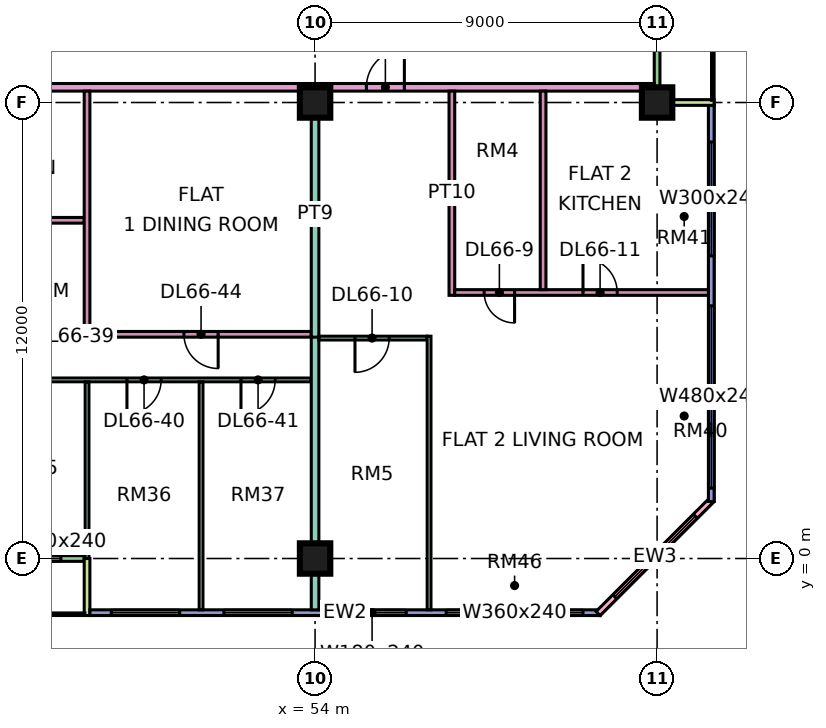
"""IFC4 building model, lengths in metres.
Left out: names, types, materials, properties, quantities, classifications, styles, units other than length and angle.
Written with IfcOpenShell. Run it as: python <this file> out.ifc"""

import sys

from ifc_helpers import new_model, si_unit, direction, frame, frame_2d, origin, origin_2d, place, context, subcontext, project, spatial, rectangle, extrude, element, fill, save


model = new_model("IFC4")
c1 = context("Model", 3, precision=1e-05, world=origin(), true_north=direction((0.0, 1.0)))
c2 = subcontext(c1, "Body", "Model", "MODEL_VIEW")
j1 = project(units=[si_unit("LENGTHUNIT", "METRE"), si_unit("PLANEANGLEUNIT", "RADIAN")], contexts=[c1])
p1 = place(None, origin())
s1 = spatial("IfcSite", under=j1, at=p1, CompositionType="ELEMENT")
p2 = place(p1, origin())
s2 = spatial("IfcBuilding", under=s1, at=p2, CompositionType="ELEMENT")
p3 = place(p2, frame((0.0, 0.0, 284.65)))
s3 = spatial("IfcBuildingStorey", under=s2, at=p3, CompositionType="ELEMENT", Elevation=284.65)
for number, where, z_axis, x_axis in (
    (1, (54.0, 0.0, 0.0), (0.0, 0.0, 1.0), (1.0, 0.0, 0.0)),
    (2, (54.0, 12.0, 0.0), (0.0, 0.0, 1.0), (1.0, 0.0, 0.0)),
    (3, (63.0, 12.0, 0.0), (0.0, 0.0, 1.0), (1.0, 0.0, 0.0)),
):
    element("IfcColumn", number, at=place(p3, frame(where, z_axis=z_axis, x_axis=x_axis)), inside=s3, PredefinedType="COLUMN", context=c2, shape_type="SweptSolid", body=[
        extrude(rectangle(XDim=0.8, YDim=0.8, at=origin_2d()), origin(), (0.0, 0.0, 1.0), 3.75),
    ])
p4 = place(p3, frame((36.075, 0.0, 0.0), z_axis=(0.0, 0.0, 1.0), x_axis=(1.0, 0.0, 0.0)))
e4 = element("IfcWall", 4, at=p4, inside=s3, PredefinedType="SOLIDWALL", context=c2, shape_type="SweptSolid", body=[
    extrude(rectangle(XDim=11.85, YDim=0.15, at=frame_2d((5.925, 0.0))), origin(), (0.0, 0.0, 1.0), 3.35),
])
p5 = place(p4, frame((2.275, 0.0, 0.0)))
e5 = element("IfcOpeningElement", 5, at=p5, cuts=e4, PredefinedType="OPENING", context=c2, shape_type="SweptSolid", body=[
    extrude(rectangle(XDim=1.8, YDim=2.4, at=frame_2d((0.9, 1.2))), frame((0.0, 0.085, 0.0), z_axis=(0.0, -1.0, 0.0), x_axis=(1.0, 0.0, 0.0)), (0.0, 0.0, 1.0), 0.17),
])
p6 = place(p4, frame((6.275, 0.0, 0.45)))
e6 = element("IfcOpeningElement", 6, at=p6, cuts=e4, PredefinedType="OPENING", context=c2, shape_type="SweptSolid", body=[
    extrude(rectangle(XDim=1.8, YDim=2.4, at=frame_2d((0.9, 1.2))), frame((0.0, 0.085, 0.0), z_axis=(0.0, -1.0, 0.0), x_axis=(1.0, 0.0, 0.0)), (0.0, 0.0, 1.0), 0.17),
])
p7 = place(p4, frame((10.038, 0.0, 0.45)))
e7 = element("IfcOpeningElement", 7, at=p7, cuts=e4, PredefinedType="OPENING", context=c2, shape_type="SweptSolid", body=[
    extrude(rectangle(XDim=1.2, YDim=2.4, at=frame_2d((0.6, 1.2))), frame((0.0, 0.085, 0.0), z_axis=(0.0, -1.0, 0.0), x_axis=(1.0, 0.0, 0.0)), (0.0, 0.0, 1.0), 0.17),
])
p8 = place(p3, frame((48.0, -1.5, 0.0), z_axis=(0.0, 0.0, 1.0), x_axis=(0.0, 1.0, 0.0)))
e8 = element("IfcWall", 8, at=p8, inside=s3, PredefinedType="SOLIDWALL", context=c2, shape_type="SweptSolid", body=[
    extrude(rectangle(XDim=1.5, YDim=0.15, at=frame_2d((0.75, 0.0))), origin(), (0.0, 0.0, 1.0), 3.35),
])
p9 = place(p3, frame((48.075, -1.425, 0.0), z_axis=(0.0, 0.0, 1.0), x_axis=(1.0, 0.0, 0.0)))
e9 = element("IfcWall", 9, at=p9, inside=s3, PredefinedType="SOLIDWALL", context=c2, shape_type="SweptSolid", body=[
    extrude(rectangle(XDim=13.425, YDim=0.15, at=frame_2d((6.712, 0.0))), origin(), (0.0, 0.0, 1.0), 3.35),
])
p10 = place(p9, frame((0.562, 0.0, 0.45)))
e10 = element("IfcOpeningElement", 10, at=p10, cuts=e9, PredefinedType="OPENING", context=c2, shape_type="SweptSolid", body=[
    extrude(rectangle(XDim=1.8, YDim=2.4, at=frame_2d((0.9, 1.2))), frame((0.0, 0.085, 0.0), z_axis=(0.0, -1.0, 0.0), x_axis=(1.0, 0.0, 0.0)), (0.0, 0.0, 1.0), 0.17),
])
p11 = place(p9, frame((3.525, 0.0, 0.45)))
e11 = element("IfcOpeningElement", 11, at=p11, cuts=e9, PredefinedType="OPENING", context=c2, shape_type="SweptSolid", body=[
    extrude(rectangle(XDim=1.8, YDim=2.4, at=frame_2d((0.9, 1.2))), frame((0.0, 0.085, 0.0), z_axis=(0.0, -1.0, 0.0), x_axis=(1.0, 0.0, 0.0)), (0.0, 0.0, 1.0), 0.17),
])
p12 = place(p9, frame((6.525, 0.0, 0.45)))
e12 = element("IfcOpeningElement", 12, at=p12, cuts=e9, PredefinedType="OPENING", context=c2, shape_type="SweptSolid", body=[
    extrude(rectangle(XDim=1.8, YDim=2.4, at=frame_2d((0.9, 1.2))), frame((0.0, 0.085, 0.0), z_axis=(0.0, -1.0, 0.0), x_axis=(1.0, 0.0, 0.0)), (0.0, 0.0, 1.0), 0.17),
])
p13 = place(p9, frame((9.375, 0.0, 0.45)))
e13 = element("IfcOpeningElement", 13, at=p13, cuts=e9, PredefinedType="OPENING", context=c2, shape_type="SweptSolid", body=[
    extrude(rectangle(XDim=3.6, YDim=2.4, at=frame_2d((1.8, 1.2))), frame((0.0, 0.085, 0.0), z_axis=(0.0, -1.0, 0.0), x_axis=(1.0, 0.0, 0.0)), (0.0, 0.0, 1.0), 0.17),
])
p14 = place(p3, frame((61.447, -1.447, 0.0), z_axis=(0.0, 0.0, 1.0), x_axis=(0.707106781187, 0.707106781187, 0.0)))
e14 = element("IfcWall", 14, at=p14, inside=s3, PredefinedType="SOLIDWALL", context=c2, shape_type="SweptSolid", body=[
    extrude(rectangle(XDim=4.243, YDim=0.15, at=frame_2d((2.121, 0.0))), origin(), (0.0, 0.0, 1.0), 3.35),
])
p15 = place(p14, frame((0.621, 0.0, 0.45)))
e15 = element("IfcOpeningElement", 15, at=p15, cuts=e14, PredefinedType="OPENING", context=c2, shape_type="SweptSolid", body=[
    extrude(rectangle(XDim=3.0, YDim=2.4, at=frame_2d((1.5, 1.2))), frame((0.0, 0.085, 0.0), z_axis=(0.0, -1.0, 0.0), x_axis=(1.0, 0.0, 0.0)), (0.0, 0.0, 1.0), 0.17),
])
p16 = place(p3, frame((64.425, 1.5, 0.0), z_axis=(0.0, 0.0, 1.0), x_axis=(0.0, 1.0, 0.0)))
e16 = element("IfcWall", 16, at=p16, inside=s3, PredefinedType="SOLIDWALL", context=c2, shape_type="SweptSolid", body=[
    extrude(rectangle(XDim=10.425, YDim=0.15, at=frame_2d((5.212, 0.0))), origin(), (0.0, 0.0, 1.0), 3.35),
])
p17 = place(p16, frame((0.35, 0.0, 0.45)))
e17 = element("IfcOpeningElement", 17, at=p17, cuts=e16, PredefinedType="OPENING", context=c2, shape_type="SweptSolid", body=[
    extrude(rectangle(XDim=4.8, YDim=2.4, at=frame_2d((2.4, 1.2))), frame((0.0, 0.085, 0.0), z_axis=(0.0, -1.0, 0.0), x_axis=(1.0, 0.0, 0.0)), (0.0, 0.0, 1.0), 0.17),
])
p18 = place(p16, frame((6.462, 0.0, 0.45)))
e18 = element("IfcOpeningElement", 18, at=p18, cuts=e16, PredefinedType="OPENING", context=c2, shape_type="SweptSolid", body=[
    extrude(rectangle(XDim=3.0, YDim=2.4, at=frame_2d((1.5, 1.2))), frame((0.0, 0.085, 0.0), z_axis=(0.0, -1.0, 0.0), x_axis=(1.0, 0.0, 0.0)), (0.0, 0.0, 1.0), 0.17),
])
p19 = place(p3, frame((63.0, 12.075, 0.0), z_axis=(0.0, 0.0, 1.0), x_axis=(0.0, 1.0, 0.0)))
e19 = element("IfcWall", 19, at=p19, inside=s3, PredefinedType="SOLIDWALL", context=c2, shape_type="SweptSolid", body=[
    extrude(rectangle(XDim=10.35, YDim=0.15, at=frame_2d((5.175, 0.0))), origin(), (0.0, 0.0, 1.0), 3.35),
])
p20 = place(p19, frame((3.975, 0.0, 0.45)))
e20 = element("IfcOpeningElement", 20, at=p20, cuts=e19, PredefinedType="OPENING", context=c2, shape_type="SweptSolid", body=[
    extrude(rectangle(XDim=1.8, YDim=2.4, at=frame_2d((0.9, 1.2))), frame((0.0, 0.085, 0.0), z_axis=(0.0, -1.0, 0.0), x_axis=(1.0, 0.0, 0.0)), (0.0, 0.0, 1.0), 0.17),
])
p21 = place(p19, frame((7.988, 0.0, 0.45)))
e21 = element("IfcOpeningElement", 21, at=p21, cuts=e19, PredefinedType="OPENING", context=c2, shape_type="SweptSolid", body=[
    extrude(rectangle(XDim=1.8, YDim=2.4, at=frame_2d((0.9, 1.2))), frame((0.0, 0.085, 0.0), z_axis=(0.0, -1.0, 0.0), x_axis=(1.0, 0.0, 0.0)), (0.0, 0.0, 1.0), 0.17),
])
p22 = place(p3, frame((64.5, 12.0, 0.0), z_axis=(0.0, 0.0, 1.0), x_axis=(-1.0, 0.0, 0.0)))
e22 = element("IfcWall", 22, at=p22, inside=s3, PredefinedType="SOLIDWALL", context=c2, shape_type="SweptSolid", body=[
    extrude(rectangle(XDim=1.5, YDim=0.15, at=frame_2d((0.75, 0.0))), origin(), (0.0, 0.0, 1.0), 3.35),
])
p23 = place(p3, frame((33.05, 4.7, 0.0), z_axis=(0.0, 0.0, 1.0), x_axis=(1.0, 0.0, 0.0)))
e23 = element("IfcWall", 23, at=p23, inside=s3, PredefinedType="PARTITIONING", context=c2, shape_type="SweptSolid", body=[
    extrude(rectangle(XDim=20.85, YDim=0.1, at=frame_2d((10.425, 0.0))), origin(), (0.0, 0.0, 1.0), 3.35),
])
p24 = place(p23, frame((10.0, 0.0, 0.0)))
e24 = element("IfcOpeningElement", 24, at=p24, cuts=e23, PredefinedType="OPENING", context=c2, shape_type="SweptSolid", body=[
    extrude(rectangle(XDim=0.9, YDim=2.1, at=frame_2d((0.45, 1.05))), frame((0.0, 0.06, 0.0), z_axis=(0.0, -1.0, 0.0), x_axis=(1.0, 0.0, 0.0)), (0.0, 0.0, 1.0), 0.12),
])
p25 = place(p23, frame((13.0, 0.0, 0.0)))
e25 = element("IfcOpeningElement", 25, at=p25, cuts=e23, PredefinedType="OPENING", context=c2, shape_type="SweptSolid", body=[
    extrude(rectangle(XDim=0.9, YDim=2.1, at=frame_2d((0.45, 1.05))), frame((0.0, 0.06, 0.0), z_axis=(0.0, -1.0, 0.0), x_axis=(1.0, 0.0, 0.0)), (0.0, 0.0, 1.0), 0.12),
])
p26 = place(p23, frame((16.0, 0.0, 0.0)))
e26 = element("IfcOpeningElement", 26, at=p26, cuts=e23, PredefinedType="OPENING", context=c2, shape_type="SweptSolid", body=[
    extrude(rectangle(XDim=0.9, YDim=2.1, at=frame_2d((0.45, 1.05))), frame((0.0, 0.06, 0.0), z_axis=(0.0, -1.0, 0.0), x_axis=(1.0, 0.0, 0.0)), (0.0, 0.0, 1.0), 0.12),
])
p27 = place(p23, frame((19.0, 0.0, 0.0)))
e27 = element("IfcOpeningElement", 27, at=p27, cuts=e23, PredefinedType="OPENING", context=c2, shape_type="SweptSolid", body=[
    extrude(rectangle(XDim=0.9, YDim=2.1, at=frame_2d((0.45, 1.05))), frame((0.0, 0.06, 0.0), z_axis=(0.0, -1.0, 0.0), x_axis=(1.0, 0.0, 0.0)), (0.0, 0.0, 1.0), 0.12),
])
p28 = place(p23, frame((4.0, 0.0, 0.0)))
e28 = element("IfcOpeningElement", 28, at=p28, cuts=e23, PredefinedType="OPENING", context=c2, shape_type="SweptSolid", body=[
    extrude(rectangle(XDim=0.9, YDim=2.1, at=frame_2d((0.45, 1.05))), frame((0.0, 0.06, 0.0), z_axis=(0.0, -1.0, 0.0), x_axis=(1.0, 0.0, 0.0)), (0.0, 0.0, 1.0), 0.12),
])
p29 = place(p3, frame((40.65, 12.4, 0.0), z_axis=(0.0, 0.0, 1.0), x_axis=(1.0, 0.0, 0.0)))
e29 = element("IfcWall", 29, at=p29, inside=s3, PredefinedType="PARTITIONING", context=c2, shape_type="SweptSolid", body=[
    extrude(rectangle(XDim=22.276, YDim=0.2, at=frame_2d((11.138, 0.0))), origin(), (0.0, 0.0, 1.0), 3.35),
])
p30 = place(p29, frame((14.7, 0.0, 0.0)))
e30 = element("IfcOpeningElement", 30, at=p30, cuts=e29, PredefinedType="OPENING", context=c2, shape_type="SweptSolid", body=[
    extrude(rectangle(XDim=1.0, YDim=2.1, at=frame_2d((0.5, 1.05))), frame((0.0, 0.11, 0.0), z_axis=(0.0, -1.0, 0.0), x_axis=(1.0, 0.0, 0.0)), (0.0, 0.0, 1.0), 0.22),
])
p31 = place(p29, frame((1.05, 0.0, 0.0)))
e31 = element("IfcOpeningElement", 31, at=p31, cuts=e29, PredefinedType="OPENING", context=c2, shape_type="SweptSolid", body=[
    extrude(rectangle(XDim=1.0, YDim=2.1, at=frame_2d((0.5, 1.05))), frame((0.0, 0.11, 0.0), z_axis=(0.0, -1.0, 0.0), x_axis=(1.0, 0.0, 0.0)), (0.0, 0.0, 1.0), 0.22),
])
p32 = place(p3, frame((43.575, 5.9, 0.0), z_axis=(0.0, 0.0, 1.0), x_axis=(1.0, 0.0, 0.0)))
e32 = element("IfcWall", 32, at=p32, inside=s3, PredefinedType="PARTITIONING", context=c2, shape_type="SweptSolid", body=[
    extrude(rectangle(XDim=10.325, YDim=0.15, at=frame_2d((5.163, 0.0))), origin(), (0.0, 0.0, 1.0), 3.35),
])
p33 = place(p32, frame((1.825, 0.0, 0.0)))
e33 = element("IfcOpeningElement", 33, at=p33, cuts=e32, PredefinedType="OPENING", context=c2, shape_type="SweptSolid", body=[
    extrude(rectangle(XDim=0.8, YDim=2.1, at=frame_2d((0.4, 1.05))), frame((0.0, 0.085, 0.0), z_axis=(0.0, -1.0, 0.0), x_axis=(1.0, 0.0, 0.0)), (0.0, 0.0, 1.0), 0.17),
])
p34 = place(p32, frame((6.975, 0.0, 0.0)))
e34 = element("IfcOpeningElement", 34, at=p34, cuts=e32, PredefinedType="OPENING", context=c2, shape_type="SweptSolid", body=[
    extrude(rectangle(XDim=0.9, YDim=2.1, at=frame_2d((0.45, 1.05))), frame((0.0, 0.085, 0.0), z_axis=(0.0, -1.0, 0.0), x_axis=(1.0, 0.0, 0.0)), (0.0, 0.0, 1.0), 0.17),
])
p35 = place(p3, frame((43.725, 8.9, 0.0), z_axis=(0.0, 0.0, 1.0), x_axis=(1.0, 0.0, 0.0)))
e35 = element("IfcWall", 35, at=p35, inside=s3, PredefinedType="PARTITIONING", context=c2, shape_type="SweptSolid", body=[
    extrude(rectangle(XDim=4.2, YDim=0.15, at=frame_2d((2.1, 0.0))), origin(), (0.0, 0.0, 1.0), 3.35),
])
p36 = place(p3, frame((48.0, 0.0, 0.0), z_axis=(0.0, 0.0, 1.0), x_axis=(0.0, 1.0, 0.0)))
e36 = element("IfcWall", 36, at=p36, inside=s3, PredefinedType="PARTITIONING", context=c2, shape_type="SweptSolid", body=[
    extrude(rectangle(XDim=4.65, YDim=0.1, at=frame_2d((2.325, 0.0))), origin(), (0.0, 0.0, 1.0), 3.35),
])
p37 = place(p3, frame((48.0, 5.975, 0.0), z_axis=(0.0, 0.0, 1.0), x_axis=(0.0, 1.0, 0.0)))
e37 = element("IfcWall", 37, at=p37, inside=s3, PredefinedType="PARTITIONING", context=c2, shape_type="SweptSolid", body=[
    extrude(rectangle(XDim=6.325, YDim=0.15, at=frame_2d((3.163, 0.0))), origin(), (0.0, 0.0, 1.0), 3.35),
])
p38 = place(p3, frame((51.0, -1.351, 0.0), z_axis=(0.0, 0.0, 1.0), x_axis=(0.0, 1.0, 0.0)))
e38 = element("IfcWall", 38, at=p38, inside=s3, PredefinedType="PARTITIONING", context=c2, shape_type="SweptSolid", body=[
    extrude(rectangle(XDim=6.001, YDim=0.1, at=frame_2d((3.0, 0.0))), origin(), (0.0, 0.0, 1.0), 3.35),
])
p39 = place(p3, frame((54.0, -1.351, 0.0), z_axis=(0.0, 0.0, 1.0), x_axis=(0.0, 1.0, 0.0)))
e39 = element("IfcWall", 39, at=p39, inside=s3, PredefinedType="PARTITIONING", context=c2, shape_type="SweptSolid", body=[
    extrude(rectangle(XDim=7.201, YDim=0.2, at=frame_2d((3.601, 0.0))), origin(), (0.0, 0.0, 1.0), 3.35),
])
p40 = place(p3, frame((54.0, 5.825, 0.0), z_axis=(0.0, 0.0, 1.0), x_axis=(0.0, 1.0, 0.0)))
e40 = element("IfcWall", 40, at=p40, inside=s3, PredefinedType="PARTITIONING", context=c2, shape_type="SweptSolid", body=[
    extrude(rectangle(XDim=6.475, YDim=0.2, at=frame_2d((3.238, 0.0))), origin(), (0.0, 0.0, 1.0), 3.35),
])
p41 = place(p3, frame((54.1, 5.8, 0.0), z_axis=(0.0, 0.0, 1.0), x_axis=(1.0, 0.0, 0.0)))
e41 = element("IfcWall", 41, at=p41, inside=s3, PredefinedType="PARTITIONING", context=c2, shape_type="SweptSolid", body=[
    extrude(rectangle(XDim=2.85, YDim=0.1, at=frame_2d((1.425, 0.0))), origin(), (0.0, 0.0, 1.0), 3.35),
])
p42 = place(p41, frame((0.95, 0.0, 0.0)))
e42 = element("IfcOpeningElement", 42, at=p42, cuts=e41, PredefinedType="OPENING", context=c2, shape_type="SweptSolid", body=[
    extrude(rectangle(XDim=0.9, YDim=2.1, at=frame_2d((0.45, 1.05))), frame((0.0, 0.06, 0.0), z_axis=(0.0, -1.0, 0.0), x_axis=(1.0, 0.0, 0.0)), (0.0, 0.0, 1.0), 0.12),
])
p43 = place(p3, frame((57.0, -1.35, 0.0), z_axis=(0.0, 0.0, 1.0), x_axis=(0.0, 1.0, 0.0)))
e43 = element("IfcWall", 43, at=p43, inside=s3, PredefinedType="PARTITIONING", context=c2, shape_type="SweptSolid", body=[
    extrude(rectangle(XDim=7.2, YDim=0.1, at=frame_2d((3.6, 0.0))), origin(), (0.0, 0.0, 1.0), 3.35),
])
p44 = place(p3, frame((57.6, 6.925, 0.0), z_axis=(0.0, 0.0, 1.0), x_axis=(0.0, 1.0, 0.0)))
e44 = element("IfcWall", 44, at=p44, inside=s3, PredefinedType="PARTITIONING", context=c2, shape_type="SweptSolid", body=[
    extrude(rectangle(XDim=5.375, YDim=0.15, at=frame_2d((2.688, 0.0))), origin(), (0.0, 0.0, 1.0), 3.35),
])
p45 = place(p3, frame((57.675, 7.0, 0.0), z_axis=(0.0, 0.0, 1.0), x_axis=(1.0, 0.0, 0.0)))
e45 = element("IfcWall", 45, at=p45, inside=s3, PredefinedType="PARTITIONING", context=c2, shape_type="SweptSolid", body=[
    extrude(rectangle(XDim=6.675, YDim=0.15, at=frame_2d((3.337, 0.0))), origin(), (0.0, 0.0, 1.0), 3.35),
])
p46 = place(p45, frame((0.775, 0.0, 0.0)))
e46 = element("IfcOpeningElement", 46, at=p46, cuts=e45, PredefinedType="OPENING", context=c2, shape_type="SweptSolid", body=[
    extrude(rectangle(XDim=0.8, YDim=2.1, at=frame_2d((0.4, 1.05))), frame((0.0, 0.085, 0.0), z_axis=(0.0, -1.0, 0.0), x_axis=(1.0, 0.0, 0.0)), (0.0, 0.0, 1.0), 0.17),
])
p47 = place(p45, frame((3.375, 0.0, 0.0)))
e47 = element("IfcOpeningElement", 47, at=p47, cuts=e45, PredefinedType="OPENING", context=c2, shape_type="SweptSolid", body=[
    extrude(rectangle(XDim=0.9, YDim=2.1, at=frame_2d((0.45, 1.05))), frame((0.0, 0.085, 0.0), z_axis=(0.0, -1.0, 0.0), x_axis=(1.0, 0.0, 0.0)), (0.0, 0.0, 1.0), 0.17),
])
p48 = place(p3, frame((60.0, 7.075, 0.0), z_axis=(0.0, 0.0, 1.0), x_axis=(0.0, 1.0, 0.0)))
e48 = element("IfcWall", 48, at=p48, inside=s3, PredefinedType="PARTITIONING", context=c2, shape_type="SweptSolid", body=[
    extrude(rectangle(XDim=5.225, YDim=0.15, at=frame_2d((2.613, 0.0))), origin(), (0.0, 0.0, 1.0), 3.35),
])
p49 = place(p7, origin())
e49 = element("IfcWindow", 49, at=p49, inside=s3, PartitioningType="SINGLE_PANEL", PredefinedType="WINDOW", context=c2, shape_type="SweptSolid", body=[
    extrude(rectangle(XDim=1.2, YDim=2.4, at=frame_2d((0.6, 1.2))), frame((0.0, 0.03, 0.0), z_axis=(0.0, -1.0, 0.0), x_axis=(1.0, 0.0, 0.0)), (0.0, 0.0, 1.0), 0.06),
])
fill(e7, e49)
p50 = place(p10, origin())
e50 = element("IfcWindow", 50, at=p50, inside=s3, PartitioningType="SINGLE_PANEL", PredefinedType="WINDOW", context=c2, shape_type="SweptSolid", body=[
    extrude(rectangle(XDim=1.8, YDim=2.4, at=frame_2d((0.9, 1.2))), frame((0.0, 0.03, 0.0), z_axis=(0.0, -1.0, 0.0), x_axis=(1.0, 0.0, 0.0)), (0.0, 0.0, 1.0), 0.06),
])
fill(e10, e50)
p51 = place(p11, origin())
e51 = element("IfcWindow", 51, at=p51, inside=s3, PartitioningType="SINGLE_PANEL", PredefinedType="WINDOW", context=c2, shape_type="SweptSolid", body=[
    extrude(rectangle(XDim=1.8, YDim=2.4, at=frame_2d((0.9, 1.2))), frame((0.0, 0.03, 0.0), z_axis=(0.0, -1.0, 0.0), x_axis=(1.0, 0.0, 0.0)), (0.0, 0.0, 1.0), 0.06),
])
fill(e11, e51)
p52 = place(p12, origin())
e52 = element("IfcWindow", 52, at=p52, inside=s3, PartitioningType="SINGLE_PANEL", PredefinedType="WINDOW", context=c2, shape_type="SweptSolid", body=[
    extrude(rectangle(XDim=1.8, YDim=2.4, at=frame_2d((0.9, 1.2))), frame((0.0, 0.03, 0.0), z_axis=(0.0, -1.0, 0.0), x_axis=(1.0, 0.0, 0.0)), (0.0, 0.0, 1.0), 0.06),
])
fill(e12, e52)
p53 = place(p13, origin())
e53 = element("IfcWindow", 53, at=p53, inside=s3, PartitioningType="SINGLE_PANEL", PredefinedType="WINDOW", context=c2, shape_type="SweptSolid", body=[
    extrude(rectangle(XDim=3.6, YDim=2.4, at=frame_2d((1.8, 1.2))), frame((0.0, 0.03, 0.0), z_axis=(0.0, -1.0, 0.0), x_axis=(1.0, 0.0, 0.0)), (0.0, 0.0, 1.0), 0.06),
])
fill(e13, e53)
p54 = place(p15, origin())
e54 = element("IfcWindow", 54, at=p54, inside=s3, PartitioningType="SINGLE_PANEL", PredefinedType="WINDOW", context=c2, shape_type="SweptSolid", body=[
    extrude(rectangle(XDim=3.0, YDim=2.4, at=frame_2d((1.5, 1.2))), frame((0.0, 0.03, 0.0), z_axis=(0.0, -1.0, 0.0), x_axis=(1.0, 0.0, 0.0)), (0.0, 0.0, 1.0), 0.06),
])
fill(e15, e54)
p55 = place(p17, origin())
e55 = element("IfcWindow", 55, at=p55, inside=s3, PartitioningType="SINGLE_PANEL", PredefinedType="WINDOW", context=c2, shape_type="SweptSolid", body=[
    extrude(rectangle(XDim=4.8, YDim=2.4, at=frame_2d((2.4, 1.2))), frame((0.0, 0.03, 0.0), z_axis=(0.0, -1.0, 0.0), x_axis=(1.0, 0.0, 0.0)), (0.0, 0.0, 1.0), 0.06),
])
fill(e17, e55)
p56 = place(p18, origin())
e56 = element("IfcWindow", 56, at=p56, inside=s3, PartitioningType="SINGLE_PANEL", PredefinedType="WINDOW", context=c2, shape_type="SweptSolid", body=[
    extrude(rectangle(XDim=3.0, YDim=2.4, at=frame_2d((1.5, 1.2))), frame((0.0, 0.03, 0.0), z_axis=(0.0, -1.0, 0.0), x_axis=(1.0, 0.0, 0.0)), (0.0, 0.0, 1.0), 0.06),
])
fill(e18, e56)
p57 = place(p46, origin())
e57 = element("IfcDoor", 57, at=p57, inside=s3, OperationType="SINGLE_SWING_RIGHT", PredefinedType="DOOR", context=c2, shape_type="SweptSolid", body=[
    extrude(rectangle(XDim=0.8, YDim=2.1, at=frame_2d((0.4, 1.05))), frame((0.0, 0.025, 0.0), z_axis=(0.0, -1.0, 0.0), x_axis=(1.0, 0.0, 0.0)), (0.0, 0.0, 1.0), 0.05),
])
fill(e46, e57)
p58 = place(p42, frame((0.9, 0.0, 0.0), z_axis=(0.0, 0.0, 1.0), x_axis=(-1.0, 0.0, 0.0)))
e58 = element("IfcDoor", 58, at=p58, inside=s3, OperationType="SINGLE_SWING_LEFT", PredefinedType="DOOR", context=c2, shape_type="SweptSolid", body=[
    extrude(rectangle(XDim=0.9, YDim=2.1, at=frame_2d((0.45, 1.05))), frame((0.0, 0.025, 0.0), z_axis=(0.0, -1.0, 0.0), x_axis=(1.0, 0.0, 0.0)), (0.0, 0.0, 1.0), 0.05),
])
fill(e42, e58)
p59 = place(p47, origin())
e59 = element("IfcDoor", 59, at=p59, inside=s3, OperationType="SINGLE_SWING_LEFT", PredefinedType="DOOR", context=c2, shape_type="SweptSolid", body=[
    extrude(rectangle(XDim=0.9, YDim=2.1, at=frame_2d((0.45, 1.05))), frame((0.0, 0.025, 0.0), z_axis=(0.0, -1.0, 0.0), x_axis=(1.0, 0.0, 0.0)), (0.0, 0.0, 1.0), 0.05),
])
fill(e47, e59)
p60 = place(p30, frame((1.0, 0.0, 0.0), z_axis=(0.0, 0.0, 1.0), x_axis=(-1.0, 0.0, 0.0)))
e60 = element("IfcDoor", 60, at=p60, inside=s3, OperationType="SINGLE_SWING_RIGHT", PredefinedType="DOOR", context=c2, shape_type="SweptSolid", body=[
    extrude(rectangle(XDim=1.0, YDim=2.1, at=frame_2d((0.5, 1.05))), frame((0.0, 0.025, 0.0), z_axis=(0.0, -1.0, 0.0), x_axis=(1.0, 0.0, 0.0)), (0.0, 0.0, 1.0), 0.05),
])
fill(e30, e60)
p61 = place(p26, frame((0.9, 0.0, 0.0), z_axis=(0.0, 0.0, 1.0), x_axis=(-1.0, 0.0, 0.0)))
e61 = element("IfcDoor", 61, at=p61, inside=s3, OperationType="SINGLE_SWING_LEFT", PredefinedType="DOOR", context=c2, shape_type="SweptSolid", body=[
    extrude(rectangle(XDim=0.9, YDim=2.1, at=frame_2d((0.45, 1.05))), frame((0.0, 0.025, 0.0), z_axis=(0.0, -1.0, 0.0), x_axis=(1.0, 0.0, 0.0)), (0.0, 0.0, 1.0), 0.05),
])
fill(e26, e61)
p62 = place(p27, frame((0.9, 0.0, 0.0), z_axis=(0.0, 0.0, 1.0), x_axis=(-1.0, 0.0, 0.0)))
e62 = element("IfcDoor", 62, at=p62, inside=s3, OperationType="SINGLE_SWING_LEFT", PredefinedType="DOOR", context=c2, shape_type="SweptSolid", body=[
    extrude(rectangle(XDim=0.9, YDim=2.1, at=frame_2d((0.45, 1.05))), frame((0.0, 0.025, 0.0), z_axis=(0.0, -1.0, 0.0), x_axis=(1.0, 0.0, 0.0)), (0.0, 0.0, 1.0), 0.05),
])
fill(e27, e62)
p63 = place(p34, origin())
e63 = element("IfcDoor", 63, at=p63, inside=s3, OperationType="SINGLE_SWING_RIGHT", PredefinedType="DOOR", context=c2, shape_type="SweptSolid", body=[
    extrude(rectangle(XDim=0.9, YDim=2.1, at=frame_2d((0.45, 1.05))), frame((0.0, 0.025, 0.0), z_axis=(0.0, -1.0, 0.0), x_axis=(1.0, 0.0, 0.0)), (0.0, 0.0, 1.0), 0.05),
])
fill(e34, e63)
save(model, sys.argv[1])
